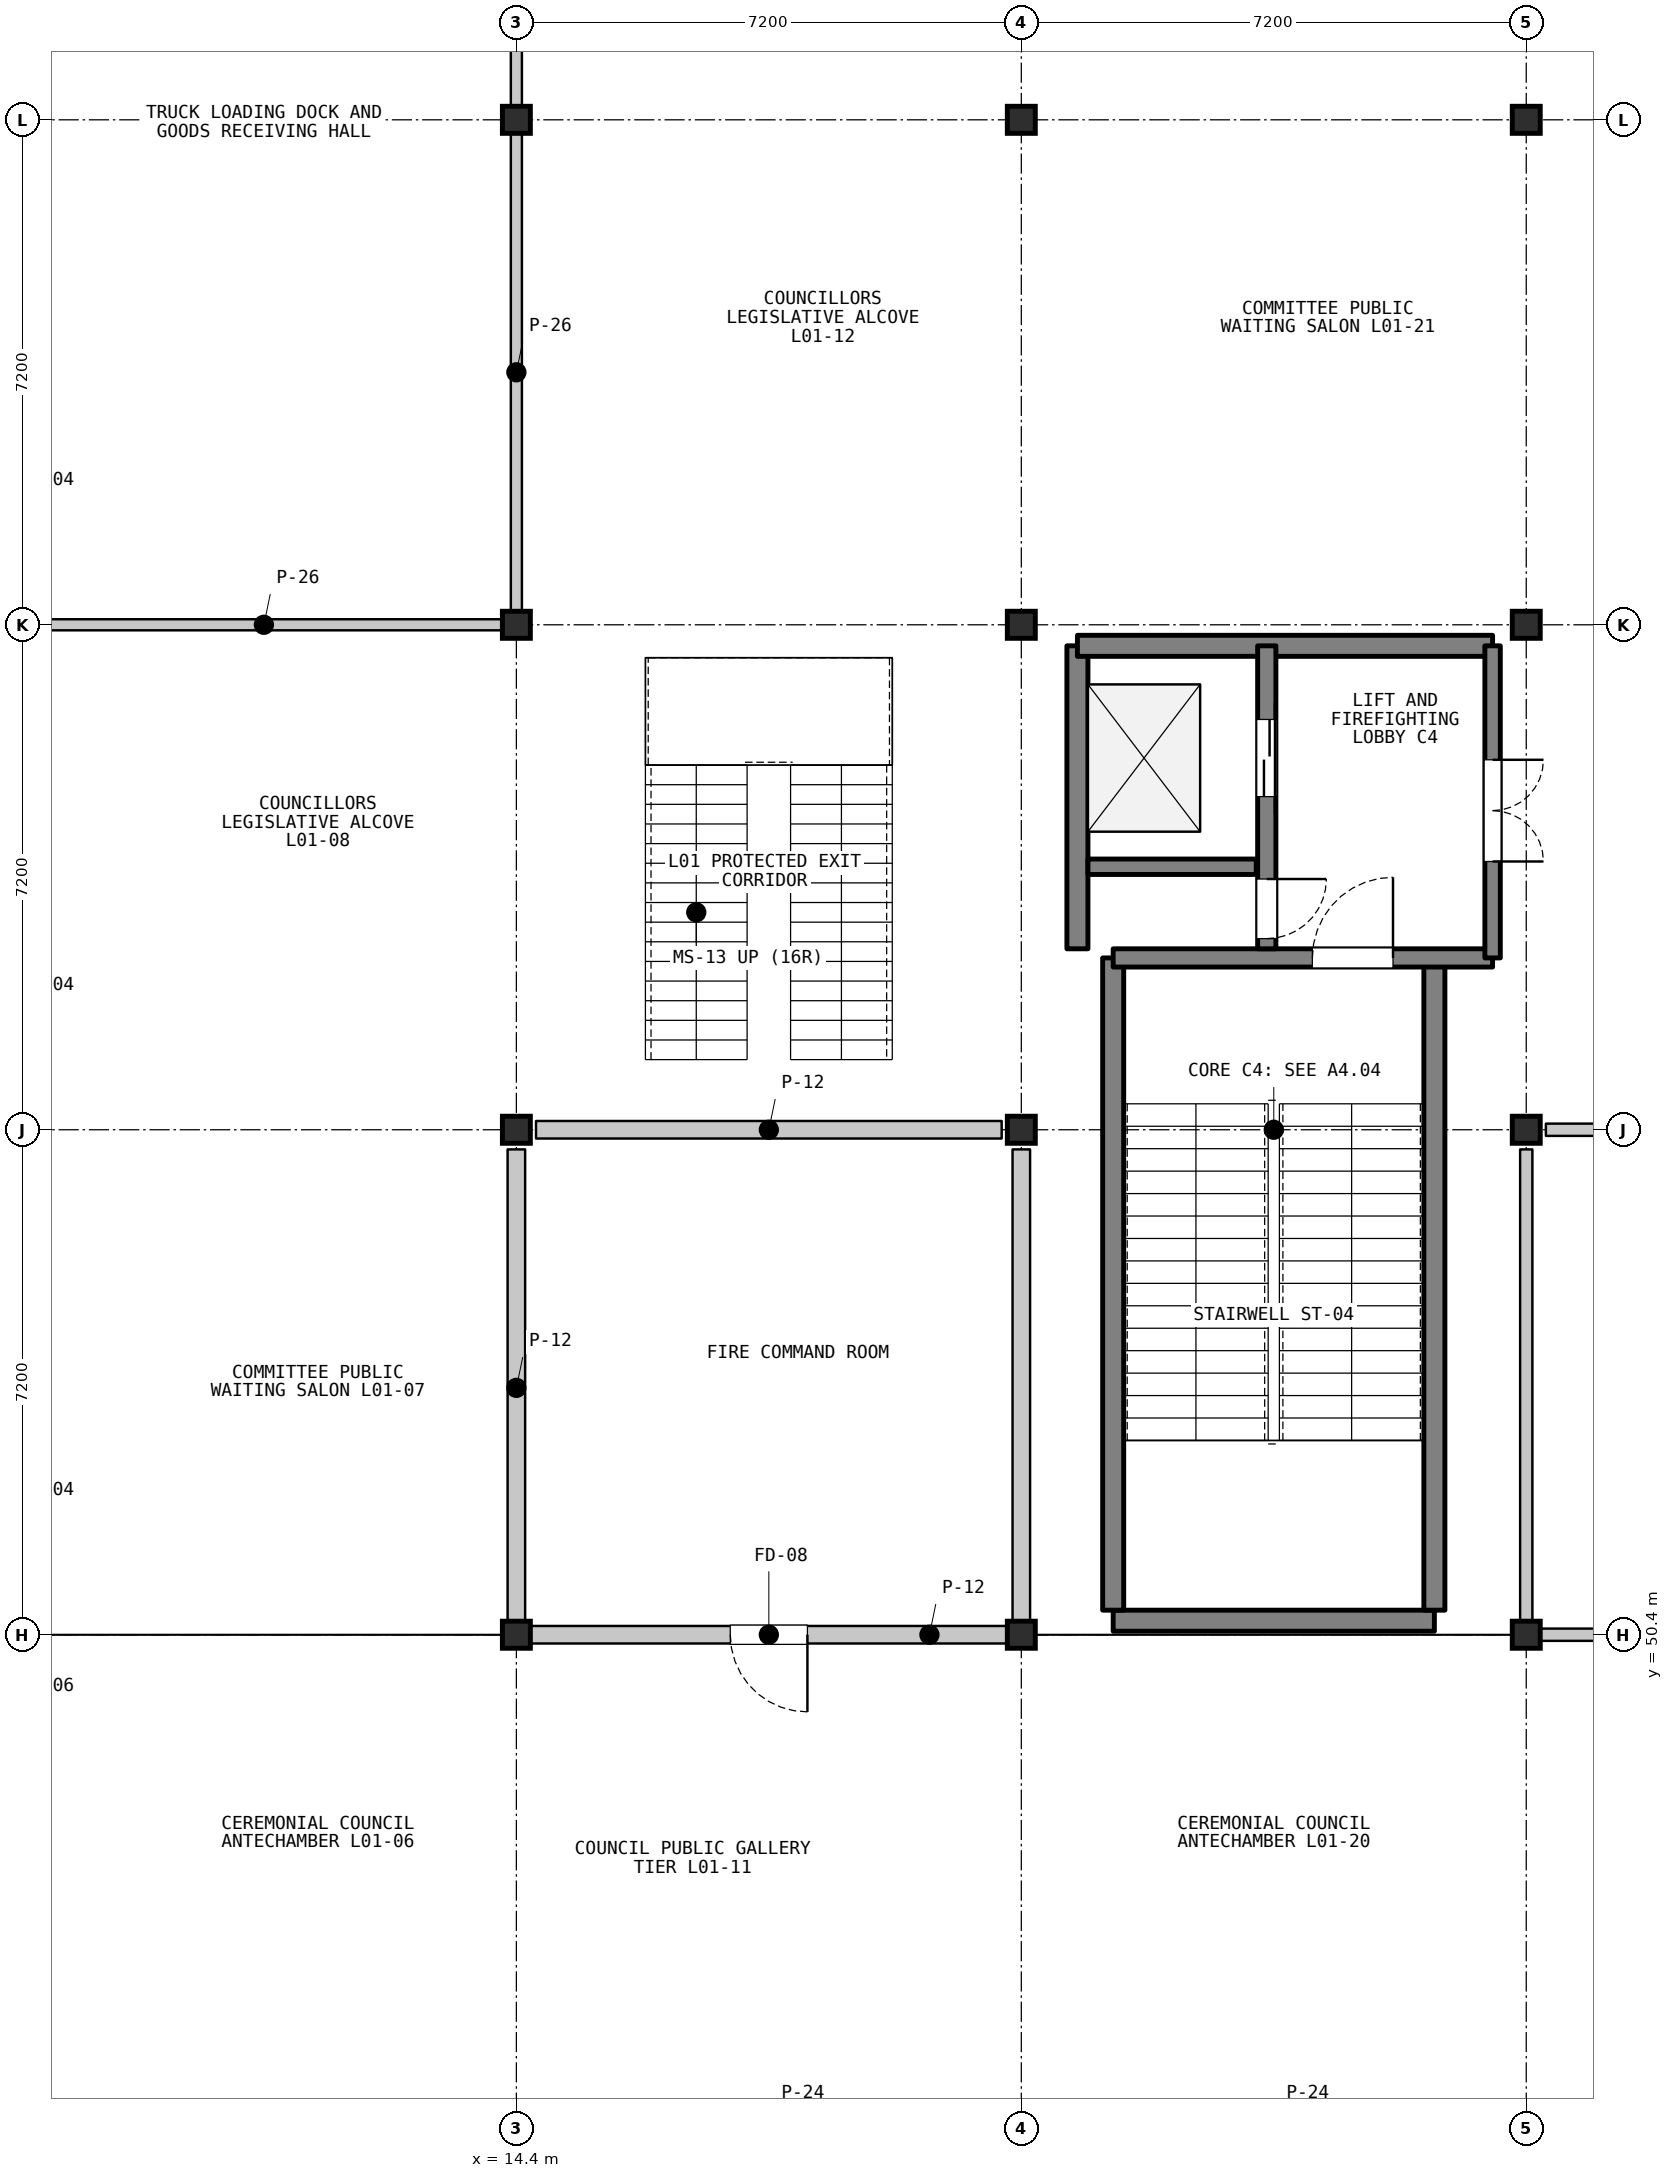
"""IFC4 building model, lengths in metres.
Left out: names, types, materials, properties, quantities, classifications, styles, units other than length and angle.
Written with IfcOpenShell. Run it as: python <this file> out.ifc"""

import sys

from ifc_helpers import new_model, si_unit, direction, frame, frame_2d, origin, origin_2d, place, context, subcontext, project, spatial, rectangle, i_section, extrude, element, fill, save


model = new_model("IFC4")
c1 = context("Model", 3, precision=1e-05, world=origin(), true_north=direction((0.0, 1.0)))
c2 = subcontext(c1, "Body", "Model", "MODEL_VIEW")
j1 = project(units=[si_unit("LENGTHUNIT", "METRE"), si_unit("PLANEANGLEUNIT", "RADIAN")], contexts=[c1])
p1 = place(None, origin())
s1 = spatial("IfcSite", under=j1, at=p1, CompositionType="ELEMENT")
p2 = place(p1, origin())
s2 = spatial("IfcBuilding", under=s1, at=p2, CompositionType="ELEMENT")
p3 = place(p2, origin())
s3 = spatial("IfcBuildingStorey", under=s2, at=p3, CompositionType="ELEMENT", Elevation=0.0)
for number, where, z_axis, x_axis in (
    (1, (14.4, 50.4, 0.0), (0.0, 0.0, 1.0), (1.0, 0.0, 0.0)),
    (2, (14.4, 57.6, 0.0), (0.0, 0.0, 1.0), (1.0, 0.0, 0.0)),
    (3, (14.4, 64.8, 0.0), (0.0, 0.0, 1.0), (1.0, 0.0, 0.0)),
    (4, (14.4, 72.0, 0.0), (0.0, 0.0, 1.0), (1.0, 0.0, 0.0)),
    (5, (21.6, 50.4, 0.0), (0.0, 0.0, 1.0), (1.0, 0.0, 0.0)),
    (6, (21.6, 57.6, 0.0), (0.0, 0.0, 1.0), (1.0, 0.0, 0.0)),
    (7, (21.6, 64.8, 0.0), (0.0, 0.0, 1.0), (1.0, 0.0, 0.0)),
    (8, (21.6, 72.0, 0.0), (0.0, 0.0, 1.0), (1.0, 0.0, 0.0)),
    (9, (28.8, 50.4, 0.0), (0.0, 0.0, 1.0), (1.0, 0.0, 0.0)),
    (10, (28.8, 57.6, 0.0), (0.0, 0.0, 1.0), (1.0, 0.0, 0.0)),
    (11, (28.8, 64.8, 0.0), (0.0, 0.0, 1.0), (1.0, 0.0, 0.0)),
    (12, (28.8, 72.0, 0.0), (0.0, 0.0, 1.0), (1.0, 0.0, 0.0)),
):
    element("IfcColumn", number, at=place(p3, frame(where, z_axis=z_axis, x_axis=x_axis)), inside=s3, PredefinedType="COLUMN", context=c2, shape_type="SweptSolid", body=[
        extrude(i_section(OverallWidth=0.399, OverallDepth=0.386, WebThickness=0.021, FlangeThickness=0.033, FilletRadius=0.015, at=origin_2d()), origin(), (0.0, 0.0, 1.0), 5.4),
    ])
p4 = place(p3, frame((22.91, 50.6, 0.0), z_axis=(0.0, 0.0, 1.0), x_axis=(1.0, 0.0, 0.0)))
e13 = element("IfcWall", 13, at=p4, inside=s3, PredefinedType="SHEAR", context=c2, shape_type="SweptSolid", body=[
    extrude(rectangle(XDim=4.58, YDim=0.3, at=frame_2d((2.29, 0.0))), origin(), (0.0, 0.0, 1.0), 5.2),
])
for number, where, z_axis, x_axis in (
    (14, (22.91, 50.75, 0.0), (0.0, 0.0, 1.0), (0.0, 1.0, 0.0)),
    (15, (27.49, 50.75, 0.0), (0.0, 0.0, 1.0), (0.0, 1.0, 0.0)),
):
    element("IfcWall", number, at=place(p3, frame(where, z_axis=z_axis, x_axis=x_axis)), inside=s3, PredefinedType="SHEAR", context=c2, shape_type="SweptSolid", body=[
        extrude(rectangle(XDim=9.3, YDim=0.3, at=frame_2d((4.65, 0.0))), origin(), (0.0, 0.0, 1.0), 5.2),
    ])
p5 = place(p3, frame((22.91, 60.05, 0.0), z_axis=(0.0, 0.0, 1.0), x_axis=(1.0, 0.0, 0.0)))
e16 = element("IfcWall", 16, at=p5, inside=s3, PredefinedType="SHEAR", context=c2, shape_type="SweptSolid", body=[
    extrude(rectangle(XDim=5.41, YDim=0.26, at=frame_2d((2.705, 0.0))), origin(), (0.0, 0.0, 1.0), 5.2),
])
p6 = place(p5, frame((2.84, 0.0, 0.0)))
e17 = element("IfcOpeningElement", 17, at=p6, cuts=e16, PredefinedType="OPENING", context=c2, shape_type="SweptSolid", body=[
    extrude(rectangle(XDim=1.15, YDim=2.15, at=frame_2d((0.575, 1.075))), frame((0.0, 0.14, 0.0), z_axis=(0.0, -1.0, 0.0), x_axis=(1.0, 0.0, 0.0)), (0.0, 0.0, 1.0), 0.28),
])
p7 = place(p3, frame((22.4, 60.18, 0.0), z_axis=(0.0, 0.0, 1.0), x_axis=(0.0, 1.0, 0.0)))
e18 = element("IfcWall", 18, at=p7, inside=s3, PredefinedType="SHEAR", context=c2, shape_type="SweptSolid", body=[
    extrude(rectangle(XDim=4.32, YDim=0.3, at=frame_2d((2.16, 0.0))), origin(), (0.0, 0.0, 1.0), 5.2),
])
p8 = place(p3, frame((22.4, 64.5, 0.0), z_axis=(0.0, 0.0, 1.0), x_axis=(1.0, 0.0, 0.0)))
e19 = element("IfcWall", 19, at=p8, inside=s3, PredefinedType="SHEAR", context=c2, shape_type="SweptSolid", body=[
    extrude(rectangle(XDim=5.92, YDim=0.3, at=frame_2d((2.96, 0.0))), origin(), (0.0, 0.0, 1.0), 5.2),
])
p9 = place(p3, frame((22.55, 61.35, 0.0), z_axis=(0.0, 0.0, 1.0), x_axis=(1.0, 0.0, 0.0)))
e20 = element("IfcWall", 20, at=p9, inside=s3, PredefinedType="SHEAR", context=c2, shape_type="SweptSolid", body=[
    extrude(rectangle(XDim=2.4, YDim=0.22, at=frame_2d((1.2, 0.0))), origin(), (0.0, 0.0, 1.0), 5.2),
])
p10 = place(p3, frame((25.1, 64.5, 0.0), z_axis=(0.0, 0.0, 1.0), x_axis=(0.0, -1.0, 0.0)))
e21 = element("IfcWall", 21, at=p10, inside=s3, PredefinedType="SHEAR", context=c2, shape_type="SweptSolid", body=[
    extrude(rectangle(XDim=4.32, YDim=0.26, at=frame_2d((2.16, 0.0))), origin(), (0.0, 0.0, 1.0), 5.2),
])
p11 = place(p10, frame((1.05, 0.0, 0.0)))
e22 = element("IfcOpeningElement", 22, at=p11, cuts=e21, PredefinedType="OPENING", context=c2, shape_type="SweptSolid", body=[
    extrude(rectangle(XDim=1.1, YDim=2.15, at=frame_2d((0.55, 1.075))), frame((0.0, 0.14, 0.0), z_axis=(0.0, -1.0, 0.0), x_axis=(1.0, 0.0, 0.0)), (0.0, 0.0, 1.0), 0.28),
])
p12 = place(p10, frame((3.325, 0.0, 0.0)))
e23 = element("IfcOpeningElement", 23, at=p12, cuts=e21, PredefinedType="OPENING", context=c2, shape_type="SweptSolid", body=[
    extrude(rectangle(XDim=0.85, YDim=2.05, at=frame_2d((0.425, 1.025))), frame((0.0, 0.14, 0.0), z_axis=(0.0, -1.0, 0.0), x_axis=(1.0, 0.0, 0.0)), (0.0, 0.0, 1.0), 0.28),
])
p13 = place(p3, frame((28.32, 64.5, 0.0), z_axis=(0.0, 0.0, 1.0), x_axis=(0.0, -1.0, 0.0)))
e24 = element("IfcWall", 24, at=p13, inside=s3, PredefinedType="SHEAR", context=c2, shape_type="SweptSolid", body=[
    extrude(rectangle(XDim=4.45, YDim=0.22, at=frame_2d((2.225, 0.0))), origin(), (0.0, 0.0, 1.0), 5.2),
])
p14 = place(p13, frame((1.625, 0.0, 0.0)))
e25 = element("IfcOpeningElement", 25, at=p14, cuts=e24, PredefinedType="OPENING", context=c2, shape_type="SweptSolid", body=[
    extrude(rectangle(XDim=1.45, YDim=2.2, at=frame_2d((0.725, 1.1))), frame((0.0, 0.12, 0.0), z_axis=(0.0, -1.0, 0.0), x_axis=(1.0, 0.0, 0.0)), (0.0, 0.0, 1.0), 0.24),
])
p15 = place(p3, frame((21.48, 50.4, 0.0), z_axis=(0.0, 0.0, 1.0), x_axis=(-1.0, 0.0, 0.0)))
e26 = element("IfcWall", 26, at=p15, inside=s3, PredefinedType="PARTITIONING", context=c2, shape_type="SweptSolid", body=[
    extrude(rectangle(XDim=6.96, YDim=0.25, at=frame_2d((3.48, 0.0))), origin(), (0.0, 0.0, 1.0), 4.588),
])
p16 = place(p15, frame((2.93, 0.0, 0.0)))
e27 = element("IfcOpeningElement", 27, at=p16, cuts=e26, PredefinedType="OPENING", context=c2, shape_type="SweptSolid", body=[
    extrude(rectangle(XDim=1.1, YDim=2.15, at=frame_2d((0.55, 1.075))), frame((0.0, 0.135, 0.0), z_axis=(0.0, -1.0, 0.0), x_axis=(1.0, 0.0, 0.0)), (0.0, 0.0, 1.0), 0.27),
])
p17 = place(p3, frame((14.68, 57.6, 0.0), z_axis=(0.0, 0.0, 1.0), x_axis=(1.0, 0.0, 0.0)))
e28 = element("IfcWall", 28, at=p17, inside=s3, PredefinedType="PARTITIONING", context=c2, shape_type="SweptSolid", body=[
    extrude(rectangle(XDim=6.64, YDim=0.25, at=frame_2d((3.32, 0.0))), origin(), (0.0, 0.0, 1.0), 4.588),
])
for number, where, z_axis, x_axis in (
    (29, (14.4, 50.52, 0.0), (0.0, 0.0, 1.0), (0.0, 1.0, 0.0)),
    (30, (21.6, 57.32, 0.0), (0.0, 0.0, 1.0), (0.0, -1.0, 0.0)),
):
    element("IfcWall", number, at=place(p3, frame(where, z_axis=z_axis, x_axis=x_axis)), inside=s3, PredefinedType="PARTITIONING", context=c2, shape_type="SweptSolid", body=[
        extrude(rectangle(XDim=6.8, YDim=0.25, at=frame_2d((3.4, 0.0))), origin(), (0.0, 0.0, 1.0), 4.588),
    ])
p18 = place(p3, frame((14.28, 64.8, 0.0), z_axis=(0.0, 0.0, 1.0), x_axis=(-1.0, 0.0, 0.0)))
e31 = element("IfcWall", 31, at=p18, inside=s3, PredefinedType="PARTITIONING", context=c2, shape_type="SweptSolid", body=[
    extrude(rectangle(XDim=6.96, YDim=0.158, at=frame_2d((3.48, 0.0))), origin(), (0.0, 0.0, 1.0), 2.035),
])
p19 = place(p3, frame((14.4, 71.88, 0.0), z_axis=(0.0, 0.0, 1.0), x_axis=(0.0, -1.0, 0.0)))
e32 = element("IfcWall", 32, at=p19, inside=s3, PredefinedType="PARTITIONING", context=c2, shape_type="SweptSolid", body=[
    extrude(rectangle(XDim=6.96, YDim=0.158, at=frame_2d((3.48, 0.0))), origin(), (0.0, 0.0, 1.0), 4.588),
])
p20 = place(p3, frame((14.4, 78.92, 0.0), z_axis=(0.0, 0.0, 1.0), x_axis=(0.0, -1.0, 0.0)))
e33 = element("IfcWall", 33, at=p20, inside=s3, PredefinedType="PARTITIONING", context=c2, shape_type="SweptSolid", body=[
    extrude(rectangle(XDim=6.8, YDim=0.158, at=frame_2d((3.4, 0.0))), origin(), (0.0, 0.0, 1.0), 4.588),
])
p21 = place(p20, frame((2.83, 0.0, 0.0)))
e34 = element("IfcOpeningElement", 34, at=p21, cuts=e33, PredefinedType="OPENING", context=c2, shape_type="SweptSolid", body=[
    extrude(rectangle(XDim=1.14, YDim=2.18, at=frame_2d((0.57, 1.09))), frame((0.0, 0.089, 0.0), z_axis=(0.0, -1.0, 0.0), x_axis=(1.0, 0.0, 0.0)), (0.0, 0.0, 1.0), 0.178),
])
p22 = place(p20, frame((0.45, 0.0, 1.05)))
e35 = element("IfcOpeningElement", 35, at=p22, cuts=e33, PredefinedType="OPENING", context=c2, shape_type="SweptSolid", body=[
    extrude(rectangle(XDim=2.0, YDim=1.2, at=frame_2d((1.0, 0.6))), frame((0.0, 0.089, 0.0), z_axis=(0.0, -1.0, 0.0), x_axis=(1.0, 0.0, 0.0)), (0.0, 0.0, 1.0), 0.178),
])
p23 = place(p3, frame((35.88, 50.4, 0.0), z_axis=(0.0, 0.0, 1.0), x_axis=(-1.0, 0.0, 0.0)))
e36 = element("IfcWall", 36, at=p23, inside=s3, PredefinedType="PARTITIONING", context=c2, shape_type="SweptSolid", body=[
    extrude(rectangle(XDim=6.96, YDim=0.175, at=frame_2d((3.48, 0.0))), origin(), (0.0, 0.0, 1.0), 4.588),
])
p24 = place(p23, frame((2.58, 0.0, 0.0)))
e37 = element("IfcOpeningElement", 37, at=p24, cuts=e36, PredefinedType="OPENING", context=c2, shape_type="SweptSolid", body=[
    extrude(rectangle(XDim=1.8, YDim=2.4, at=frame_2d((0.9, 1.2))), frame((0.0, 0.097, 0.0), z_axis=(0.0, -1.0, 0.0), x_axis=(1.0, 0.0, 0.0)), (0.0, 0.0, 1.0), 0.195),
])
p25 = place(p3, frame((29.08, 57.6, 0.0), z_axis=(0.0, 0.0, 1.0), x_axis=(1.0, 0.0, 0.0)))
e38 = element("IfcWall", 38, at=p25, inside=s3, PredefinedType="PARTITIONING", context=c2, shape_type="SweptSolid", body=[
    extrude(rectangle(XDim=6.8, YDim=0.175, at=frame_2d((3.4, 0.0))), origin(), (0.0, 0.0, 1.0), 4.588),
])
p26 = place(p3, frame((28.8, 50.52, 0.0), z_axis=(0.0, 0.0, 1.0), x_axis=(0.0, 1.0, 0.0)))
e39 = element("IfcWall", 39, at=p26, inside=s3, PredefinedType="PARTITIONING", context=c2, shape_type="SweptSolid", body=[
    extrude(rectangle(XDim=6.8, YDim=0.175, at=frame_2d((3.4, 0.0))), origin(), (0.0, 0.0, 1.0), 4.588),
])
p27 = place(p6, origin())
e40 = element("IfcDoor", 40, at=p27, inside=s3, OperationType="SINGLE_SWING_RIGHT", PredefinedType="DOOR", context=c2, shape_type="SweptSolid", body=[
    extrude(rectangle(XDim=1.15, YDim=2.15, at=frame_2d((0.575, 1.075))), frame((0.0, 0.025, 0.0), z_axis=(0.0, -1.0, 0.0), x_axis=(1.0, 0.0, 0.0)), (0.0, 0.0, 1.0), 0.05),
])
fill(e17, e40)
p28 = place(p11, origin())
e41 = element("IfcDoor", 41, at=p28, inside=s3, OperationType="DOUBLE_DOOR_SLIDING", PredefinedType="DOOR", context=c2, shape_type="SweptSolid", body=[
    extrude(rectangle(XDim=1.1, YDim=2.15, at=frame_2d((0.55, 1.075))), frame((0.0, 0.025, 0.0), z_axis=(0.0, -1.0, 0.0), x_axis=(1.0, 0.0, 0.0)), (0.0, 0.0, 1.0), 0.05),
])
fill(e22, e41)
p29 = place(p12, origin())
e42 = element("IfcDoor", 42, at=p29, inside=s3, OperationType="SINGLE_SWING_LEFT", PredefinedType="DOOR", context=c2, shape_type="SweptSolid", body=[
    extrude(rectangle(XDim=0.85, YDim=2.05, at=frame_2d((0.425, 1.025))), frame((0.0, 0.025, 0.0), z_axis=(0.0, -1.0, 0.0), x_axis=(1.0, 0.0, 0.0)), (0.0, 0.0, 1.0), 0.05),
])
fill(e23, e42)
p30 = place(p14, origin())
e43 = element("IfcDoor", 43, at=p30, inside=s3, OperationType="DOUBLE_DOOR_SINGLE_SWING", PredefinedType="DOOR", context=c2, shape_type="SweptSolid", body=[
    extrude(rectangle(XDim=1.45, YDim=2.2, at=frame_2d((0.725, 1.1))), frame((0.0, 0.025, 0.0), z_axis=(0.0, -1.0, 0.0), x_axis=(1.0, 0.0, 0.0)), (0.0, 0.0, 1.0), 0.05),
])
fill(e25, e43)
p31 = place(p16, origin())
e44 = element("IfcDoor", 44, at=p31, inside=s3, OperationType="SINGLE_SWING_LEFT", PredefinedType="DOOR", context=c2, shape_type="SweptSolid", body=[
    extrude(rectangle(XDim=1.1, YDim=2.15, at=frame_2d((0.55, 1.075))), frame((0.0, 0.025, 0.0), z_axis=(0.0, -1.0, 0.0), x_axis=(1.0, 0.0, 0.0)), (0.0, 0.0, 1.0), 0.05),
])
fill(e27, e44)
save(model, sys.argv[1])
